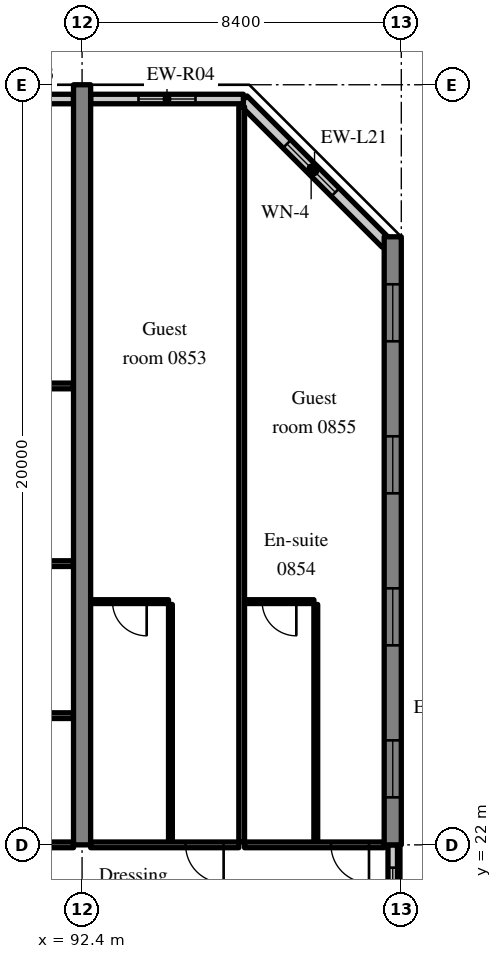
"""IFC4 building model, lengths in metres.
Left out: names, types, materials, properties, quantities, classifications, styles, units other than length and angle.
Written with IfcOpenShell. Run it as: python <this file> out.ifc"""

import sys

from ifc_helpers import new_model, si_unit, direction, frame, frame_2d, origin, place, context, subcontext, project, spatial, rectangle, extrude, source, transform, mapped, element, fill, save


model = new_model("IFC4")
c1 = context("Model", 3, precision=1e-05, world=origin(), true_north=direction((0.0, 1.0)))
c2 = subcontext(c1, "Body", "Model", "MODEL_VIEW")
j1 = project(units=[si_unit("LENGTHUNIT", "METRE"), si_unit("PLANEANGLEUNIT", "RADIAN")], contexts=[c1])
p1 = place(None, origin())
s1 = spatial("IfcSite", under=j1, at=p1, CompositionType="ELEMENT")
p2 = place(p1, origin())
s2 = spatial("IfcBuilding", under=s1, at=p2, CompositionType="ELEMENT")
p3 = place(p2, frame((0.0, 0.0, 39.2)))
s3 = spatial("IfcBuildingStorey", under=s2, at=p3, CompositionType="ELEMENT", Elevation=39.2)
m1 = source(origin(), c2, "Body", "SweptSolid", [
    extrude(rectangle(XDim=20.0, YDim=0.45, at=frame_2d((10.0, 0.0))), origin(), (0.0, 0.0, 1.0), 3.52),
])
p4 = place(p3, frame((92.4, 22.0, 0.0), z_axis=(0.0, 0.0, 1.0), x_axis=(0.0, 1.0, 0.0)))
e1 = element("IfcWall", 1, at=p4, inside=s3, PredefinedType="SHEAR", context=c2, shape_type="MappedRepresentation", body=[
    mapped(m1, transform((0.0, 0.0, 0.0), scale=1.0)),
])
m2 = source(origin(), c2, "Body", "SweptSolid", [
    extrude(rectangle(XDim=16.0, YDim=0.45, at=frame_2d((8.0, 0.0))), origin(), (0.0, 0.0, 1.0), 3.52),
])
p5 = place(p3, frame((100.575, 22.0, 0.0), z_axis=(0.0, 0.0, 1.0), x_axis=(0.0, 1.0, 0.0)))
e2 = element("IfcWall", 2, at=p5, inside=s3, PredefinedType="SHEAR", context=c2, shape_type="MappedRepresentation", body=[
    mapped(m2, transform((0.0, 0.0, 0.0), scale=1.0)),
])
m3 = source(origin(), c2, "Body", "SweptSolid", [
    extrude(rectangle(XDim=1.5, YDim=1.5, at=frame_2d((0.75, 0.75))), frame((0.0, 0.235, 0.0), z_axis=(0.0, -1.0, 0.0), x_axis=(1.0, 0.0, 0.0)), (0.0, 0.0, 1.0), 0.47),
])
p6 = place(p5, frame((1.25, 0.0, 0.9)))
e3 = element("IfcOpeningElement", 3, at=p6, cuts=e2, PredefinedType="OPENING", context=c2, shape_type="MappedRepresentation", body=[
    mapped(m3, transform((0.0, 0.0, 0.0), scale=1.0)),
])
p7 = place(p5, frame((5.25, 0.0, 0.9)))
e4 = element("IfcOpeningElement", 4, at=p7, cuts=e2, PredefinedType="OPENING", context=c2, shape_type="MappedRepresentation", body=[
    mapped(m3, transform((0.0, 0.0, 0.0), scale=1.0)),
])
p8 = place(p5, frame((9.25, 0.0, 0.9)))
e5 = element("IfcOpeningElement", 5, at=p8, cuts=e2, PredefinedType="OPENING", context=c2, shape_type="MappedRepresentation", body=[
    mapped(m3, transform((0.0, 0.0, 0.0), scale=1.0)),
])
p9 = place(p5, frame((13.25, 0.0, 0.9)))
e6 = element("IfcOpeningElement", 6, at=p9, cuts=e2, PredefinedType="OPENING", context=c2, shape_type="MappedRepresentation", body=[
    mapped(m3, transform((0.0, 0.0, 0.0), scale=1.0)),
])
m4 = source(origin(), c2, "Body", "SweptSolid", [
    extrude(rectangle(XDim=5.326, YDim=0.3, at=frame_2d((2.663, 0.0))), origin(), (0.0, 0.0, 1.0), 3.52),
])
p10 = place(p3, frame((100.4, 37.834, 0.0), z_axis=(0.0, 0.0, 1.0), x_axis=(-0.707083859269, 0.707129702361, 0.0)))
e7 = element("IfcWall", 7, at=p10, inside=s3, PredefinedType="SOLIDWALL", context=c2, shape_type="MappedRepresentation", body=[
    mapped(m4, transform((0.0, 0.0, 0.0), scale=1.0)),
])
m5 = source(origin(), c2, "Body", "SweptSolid", [
    extrude(rectangle(XDim=1.8, YDim=1.5, at=frame_2d((0.9, 0.75))), frame((0.0, 0.16, 0.0), z_axis=(0.0, -1.0, 0.0), x_axis=(1.0, 0.0, 0.0)), (0.0, 0.0, 1.0), 0.32),
])
p11 = place(p10, frame((1.889, 0.0, 0.9)))
e8 = element("IfcOpeningElement", 8, at=p11, cuts=e7, PredefinedType="OPENING", context=c2, shape_type="MappedRepresentation", body=[
    mapped(m5, transform((0.0, 0.0, 0.0), scale=1.0)),
])
m6 = source(origin(), c2, "Body", "SweptSolid", [
    extrude(rectangle(XDim=3.525, YDim=0.25, at=frame_2d((1.763, 0.0))), origin(), (0.0, 0.0, 1.0), 2.77),
])
p12 = place(p3, frame((92.175, 41.625, 0.0), z_axis=(0.0, 0.0, 1.0), x_axis=(-1.0, 0.0, 0.0)))
e9 = element("IfcWall", 9, at=p12, inside=s3, PredefinedType="SOLIDWALL", context=c2, shape_type="MappedRepresentation", body=[
    mapped(m6, transform((0.0, 0.0, 0.0), scale=1.0)),
])
m7 = source(origin(), c2, "Body", "SweptSolid", [
    extrude(rectangle(XDim=1.5, YDim=1.5, at=frame_2d((0.75, 0.75))), frame((0.0, 0.135, 0.0), z_axis=(0.0, -1.0, 0.0), x_axis=(1.0, 0.0, 0.0)), (0.0, 0.0, 1.0), 0.27),
])
p13 = place(p12, frame((1.012, 0.0, 0.9)))
e10 = element("IfcOpeningElement", 10, at=p13, cuts=e9, PredefinedType="OPENING", context=c2, shape_type="MappedRepresentation", body=[
    mapped(m7, transform((0.0, 0.0, 0.0), scale=1.0)),
])
m8 = source(origin(), c2, "Body", "SweptSolid", [
    extrude(rectangle(XDim=4.02, YDim=0.25, at=frame_2d((2.01, 0.0))), origin(), (0.0, 0.0, 1.0), 2.77),
])
p14 = place(p3, frame((96.645, 41.625, 0.0), z_axis=(0.0, 0.0, 1.0), x_axis=(-1.0, 0.0, 0.0)))
e11 = element("IfcWall", 11, at=p14, inside=s3, PredefinedType="SOLIDWALL", context=c2, shape_type="MappedRepresentation", body=[
    mapped(m8, transform((0.0, 0.0, 0.0), scale=1.0)),
])
p15 = place(p14, frame((1.26, 0.0, 0.9)))
e12 = element("IfcOpeningElement", 12, at=p15, cuts=e11, PredefinedType="OPENING", context=c2, shape_type="MappedRepresentation", body=[
    mapped(m7, transform((0.0, 0.0, 0.0), scale=1.0)),
])
m9 = source(origin(), c2, "Body", "SweptSolid", [
    extrude(rectangle(XDim=2.4, YDim=0.25, at=frame_2d((1.2, 0.0))), origin(), (0.0, 0.0, 1.0), 2.62),
])
p16 = place(p3, frame((100.575, 19.6, 0.0), z_axis=(0.0, 0.0, 1.0), x_axis=(0.0, 1.0, 0.0)))
e13 = element("IfcWall", 13, at=p16, inside=s3, PredefinedType="SOLIDWALL", context=c2, shape_type="MappedRepresentation", body=[
    mapped(m9, transform((0.0, 0.0, 0.0), scale=1.0)),
])
m10 = source(origin(), c2, "Body", "SweptSolid", [
    extrude(rectangle(XDim=1.2, YDim=1.5, at=frame_2d((0.6, 0.75))), frame((0.0, 0.135, 0.0), z_axis=(0.0, -1.0, 0.0), x_axis=(1.0, 0.0, 0.0)), (0.0, 0.0, 1.0), 0.27),
])
p17 = place(p16, frame((0.6, 0.0, 0.9)))
e14 = element("IfcOpeningElement", 14, at=p17, cuts=e13, PredefinedType="OPENING", context=c2, shape_type="MappedRepresentation", body=[
    mapped(m10, transform((0.0, 0.0, 0.0), scale=1.0)),
])
m11 = source(origin(), c2, "Body", "SweptSolid", [
    extrude(rectangle(XDim=5.4, YDim=0.15, at=frame_2d((2.7, 0.0))), origin(), (0.0, 0.0, 1.0), 2.82),
])
p18 = place(p3, frame((86.775, 22.0, 0.0), z_axis=(0.0, 0.0, 1.0), x_axis=(1.0, 0.0, 0.0)))
e15 = element("IfcWall", 15, at=p18, inside=s3, PredefinedType="PARTITIONING", context=c2, shape_type="MappedRepresentation", body=[
    mapped(m11, transform((0.0, 0.0, 0.0), scale=1.0)),
])
m12 = source(origin(), c2, "Body", "SweptSolid", [
    extrude(rectangle(XDim=5.4, YDim=0.15, at=frame_2d((2.7, 0.0))), origin(), (0.0, 0.0, 1.0), 3.52),
])
for number, where, z_axis, x_axis in (
    (16, (86.775, 25.4, 0.0), (0.0, 0.0, 1.0), (1.0, 0.0, 0.0)),
    (17, (86.775, 29.4, 0.0), (0.0, 0.0, 1.0), (1.0, 0.0, 0.0)),
):
    element("IfcWall", number, at=place(p3, frame(where, z_axis=z_axis, x_axis=x_axis)), inside=s3, PredefinedType="PARTITIONING", context=c2, shape_type="MappedRepresentation", body=[
        mapped(m12, transform((0.0, 0.0, 0.0), scale=1.0)),
    ])
m13 = source(origin(), c2, "Body", "SweptSolid", [
    extrude(rectangle(XDim=7.95, YDim=0.15, at=frame_2d((3.975, 0.0))), origin(), (0.0, 0.0, 1.0), 3.52),
])
p19 = place(p3, frame((84.225, 34.075, 0.0), z_axis=(0.0, 0.0, 1.0), x_axis=(1.0, 0.0, 0.0)))
e18 = element("IfcWall", 18, at=p19, inside=s3, PredefinedType="PARTITIONING", context=c2, shape_type="MappedRepresentation", body=[
    mapped(m13, transform((0.0, 0.0, 0.0), scale=1.0)),
])
m14 = source(origin(), c2, "Body", "SweptSolid", [
    extrude(rectangle(XDim=1.0, YDim=2.1, at=frame_2d((0.5, 1.05))), frame((0.0, 0.085, 0.0), z_axis=(0.0, -1.0, 0.0), x_axis=(1.0, 0.0, 0.0)), (0.0, 0.0, 1.0), 0.17),
])
p20 = place(p19, frame((0.7, 0.0, 0.0)))
e19 = element("IfcOpeningElement", 19, at=p20, cuts=e18, PredefinedType="OPENING", context=c2, shape_type="MappedRepresentation", body=[
    mapped(m14, transform((0.0, 0.0, 0.0), scale=1.0)),
])
m15 = source(origin(), c2, "Body", "SweptSolid", [
    extrude(rectangle(XDim=6.25, YDim=0.1, at=frame_2d((3.125, 0.0))), origin(), (0.0, 0.0, 1.0), 3.52),
])
p21 = place(p3, frame((94.725, 22.075, 0.0), z_axis=(0.0, 0.0, 1.0), x_axis=(0.0, 1.0, 0.0)))
e20 = element("IfcWall", 20, at=p21, inside=s3, PredefinedType="PARTITIONING", context=c2, shape_type="MappedRepresentation", body=[
    mapped(m15, transform((0.0, 0.0, 0.0), scale=1.0)),
])
m16 = source(origin(), c2, "Body", "SweptSolid", [
    extrude(rectangle(XDim=2.05, YDim=0.1, at=frame_2d((1.025, 0.0))), origin(), (0.0, 0.0, 1.0), 3.52),
])
p22 = place(p3, frame((92.625, 28.4, 0.0), z_axis=(0.0, 0.0, 1.0), x_axis=(1.0, 0.0, 0.0)))
e21 = element("IfcWall", 21, at=p22, inside=s3, PredefinedType="PARTITIONING", context=c2, shape_type="MappedRepresentation", body=[
    mapped(m16, transform((0.0, 0.0, 0.0), scale=1.0)),
])
m17 = source(origin(), c2, "Body", "SweptSolid", [
    extrude(rectangle(XDim=0.9, YDim=2.1, at=frame_2d((0.45, 1.05))), frame((0.0, 0.06, 0.0), z_axis=(0.0, -1.0, 0.0), x_axis=(1.0, 0.0, 0.0)), (0.0, 0.0, 1.0), 0.12),
])
p23 = place(p22, frame((0.575, 0.0, 0.0)))
e22 = element("IfcOpeningElement", 22, at=p23, cuts=e21, PredefinedType="OPENING", context=c2, shape_type="MappedRepresentation", body=[
    mapped(m17, transform((0.0, 0.0, 0.0), scale=1.0)),
])
m18 = source(origin(), c2, "Body", "SweptSolid", [
    extrude(rectangle(XDim=3.9, YDim=0.15, at=frame_2d((1.95, 0.0))), origin(), (0.0, 0.0, 1.0), 2.82),
])
p24 = place(p3, frame((92.625, 22.0, 0.0), z_axis=(0.0, 0.0, 1.0), x_axis=(1.0, 0.0, 0.0)))
e23 = element("IfcWall", 23, at=p24, inside=s3, PredefinedType="PARTITIONING", context=c2, shape_type="MappedRepresentation", body=[
    mapped(m18, transform((0.0, 0.0, 0.0), scale=1.0)),
])
p25 = place(p24, frame((2.5, 0.0, 0.0)))
e24 = element("IfcOpeningElement", 24, at=p25, cuts=e23, PredefinedType="OPENING", context=c2, shape_type="MappedRepresentation", body=[
    mapped(m14, transform((0.0, 0.0, 0.0), scale=1.0)),
])
p26 = place(p3, frame((98.55, 22.075, 0.0), z_axis=(0.0, 0.0, 1.0), x_axis=(0.0, 1.0, 0.0)))
e25 = element("IfcWall", 25, at=p26, inside=s3, PredefinedType="PARTITIONING", context=c2, shape_type="MappedRepresentation", body=[
    mapped(m15, transform((0.0, 0.0, 0.0), scale=1.0)),
])
m19 = source(origin(), c2, "Body", "SweptSolid", [
    extrude(rectangle(XDim=1.825, YDim=0.1, at=frame_2d((0.913, 0.0))), origin(), (0.0, 0.0, 1.0), 3.52),
])
p27 = place(p3, frame((96.675, 28.4, 0.0), z_axis=(0.0, 0.0, 1.0), x_axis=(1.0, 0.0, 0.0)))
e26 = element("IfcWall", 26, at=p27, inside=s3, PredefinedType="PARTITIONING", context=c2, shape_type="MappedRepresentation", body=[
    mapped(m19, transform((0.0, 0.0, 0.0), scale=1.0)),
])
p28 = place(p27, frame((0.463, 0.0, 0.0)))
e27 = element("IfcOpeningElement", 27, at=p28, cuts=e26, PredefinedType="OPENING", context=c2, shape_type="MappedRepresentation", body=[
    mapped(m17, transform((0.0, 0.0, 0.0), scale=1.0)),
])
m20 = source(origin(), c2, "Body", "SweptSolid", [
    extrude(rectangle(XDim=3.675, YDim=0.15, at=frame_2d((1.837, 0.0))), origin(), (0.0, 0.0, 1.0), 2.82),
])
p29 = place(p3, frame((96.675, 22.0, 0.0), z_axis=(0.0, 0.0, 1.0), x_axis=(1.0, 0.0, 0.0)))
e28 = element("IfcWall", 28, at=p29, inside=s3, PredefinedType="PARTITIONING", context=c2, shape_type="MappedRepresentation", body=[
    mapped(m20, transform((0.0, 0.0, 0.0), scale=1.0)),
])
p30 = place(p29, frame((2.275, 0.0, 0.0)))
e29 = element("IfcOpeningElement", 29, at=p30, cuts=e28, PredefinedType="OPENING", context=c2, shape_type="MappedRepresentation", body=[
    mapped(m14, transform((0.0, 0.0, 0.0), scale=1.0)),
])
m21 = source(origin(), c2, "Body", "SweptSolid", [
    extrude(rectangle(XDim=19.347, YDim=0.15, at=frame_2d((9.674, 0.0))), origin(), (0.0, 0.0, 1.0), 3.52),
])
p31 = place(p3, frame((96.6, 22.075, 0.0), z_axis=(0.0, 0.0, 1.0), x_axis=(0.0, 1.0, 0.0)))
e30 = element("IfcWall", 30, at=p31, inside=s3, PredefinedType="PARTITIONING", context=c2, shape_type="MappedRepresentation", body=[
    mapped(m21, transform((0.0, 0.0, 0.0), scale=1.0)),
])
m22 = source(origin(), c2, "Body", "SweptSolid", [
    extrude(rectangle(XDim=1.8, YDim=1.5, at=frame_2d((0.9, 0.75))), frame((0.0, 0.03, 0.0), z_axis=(0.0, -1.0, 0.0), x_axis=(1.0, 0.0, 0.0)), (0.0, 0.0, 1.0), 0.06),
])
p32 = place(p11, origin())
e31 = element("IfcWindow", 31, at=p32, inside=s3, PartitioningType="SINGLE_PANEL", PredefinedType="WINDOW", context=c2, shape_type="MappedRepresentation", body=[
    mapped(m22, transform((0.0, 0.0, 0.0), scale=1.0)),
])
fill(e8, e31)
m23 = source(origin(), c2, "Body", "SweptSolid", [
    extrude(rectangle(XDim=1.5, YDim=1.5, at=frame_2d((0.75, 0.75))), frame((0.0, 0.03, 0.0), z_axis=(0.0, -1.0, 0.0), x_axis=(1.0, 0.0, 0.0)), (0.0, 0.0, 1.0), 0.06),
])
p33 = place(p15, origin())
e32 = element("IfcWindow", 32, at=p33, inside=s3, PartitioningType="SINGLE_PANEL", PredefinedType="WINDOW", context=c2, shape_type="MappedRepresentation", body=[
    mapped(m23, transform((0.0, 0.0, 0.0), scale=1.0)),
])
fill(e12, e32)
p34 = place(p6, origin())
e33 = element("IfcWindow", 33, at=p34, inside=s3, PartitioningType="SINGLE_PANEL", PredefinedType="WINDOW", context=c2, shape_type="MappedRepresentation", body=[
    mapped(m23, transform((0.0, 0.0, 0.0), scale=1.0)),
])
fill(e3, e33)
p35 = place(p7, origin())
e34 = element("IfcWindow", 34, at=p35, inside=s3, PartitioningType="SINGLE_PANEL", PredefinedType="WINDOW", context=c2, shape_type="MappedRepresentation", body=[
    mapped(m23, transform((0.0, 0.0, 0.0), scale=1.0)),
])
fill(e4, e34)
p36 = place(p8, origin())
e35 = element("IfcWindow", 35, at=p36, inside=s3, PartitioningType="SINGLE_PANEL", PredefinedType="WINDOW", context=c2, shape_type="MappedRepresentation", body=[
    mapped(m23, transform((0.0, 0.0, 0.0), scale=1.0)),
])
fill(e5, e35)
p37 = place(p9, origin())
e36 = element("IfcWindow", 36, at=p37, inside=s3, PartitioningType="SINGLE_PANEL", PredefinedType="WINDOW", context=c2, shape_type="MappedRepresentation", body=[
    mapped(m23, transform((0.0, 0.0, 0.0), scale=1.0)),
])
fill(e6, e36)
m24 = source(origin(), c2, "Body", "SweptSolid", [
    extrude(rectangle(XDim=1.2, YDim=1.5, at=frame_2d((0.6, 0.75))), frame((0.0, 0.03, 0.0), z_axis=(0.0, -1.0, 0.0), x_axis=(1.0, 0.0, 0.0)), (0.0, 0.0, 1.0), 0.06),
])
p38 = place(p17, origin())
e37 = element("IfcWindow", 37, at=p38, inside=s3, PartitioningType="SINGLE_PANEL", PredefinedType="WINDOW", context=c2, shape_type="MappedRepresentation", body=[
    mapped(m24, transform((0.0, 0.0, 0.0), scale=1.0)),
])
fill(e14, e37)
m25 = source(origin(), c2, "Body", "SweptSolid", [
    extrude(rectangle(XDim=0.9, YDim=2.1, at=frame_2d((0.45, 1.05))), frame((0.0, 0.025, 0.0), z_axis=(0.0, -1.0, 0.0), x_axis=(1.0, 0.0, 0.0)), (0.0, 0.0, 1.0), 0.05),
])
p39 = place(p23, origin())
e38 = element("IfcDoor", 38, at=p39, inside=s3, OperationType="SINGLE_SWING_RIGHT", PredefinedType="DOOR", context=c2, shape_type="MappedRepresentation", body=[
    mapped(m25, transform((0.0, 0.0, 0.0), scale=1.0)),
])
fill(e22, e38)
m26 = source(origin(), c2, "Body", "SweptSolid", [
    extrude(rectangle(XDim=1.0, YDim=2.1, at=frame_2d((0.5, 1.05))), frame((0.0, 0.025, 0.0), z_axis=(0.0, -1.0, 0.0), x_axis=(1.0, 0.0, 0.0)), (0.0, 0.0, 1.0), 0.05),
])
p40 = place(p25, origin())
e39 = element("IfcDoor", 39, at=p40, inside=s3, OperationType="SINGLE_SWING_RIGHT", PredefinedType="DOOR", context=c2, shape_type="MappedRepresentation", body=[
    mapped(m26, transform((0.0, 0.0, 0.0), scale=1.0)),
])
fill(e24, e39)
p41 = place(p28, origin())
e40 = element("IfcDoor", 40, at=p41, inside=s3, OperationType="SINGLE_SWING_RIGHT", PredefinedType="DOOR", context=c2, shape_type="MappedRepresentation", body=[
    mapped(m25, transform((0.0, 0.0, 0.0), scale=1.0)),
])
fill(e27, e40)
p42 = place(p30, origin())
e41 = element("IfcDoor", 41, at=p42, inside=s3, OperationType="SINGLE_SWING_RIGHT", PredefinedType="DOOR", context=c2, shape_type="MappedRepresentation", body=[
    mapped(m26, transform((0.0, 0.0, 0.0), scale=1.0)),
])
fill(e29, e41)
save(model, sys.argv[1])
